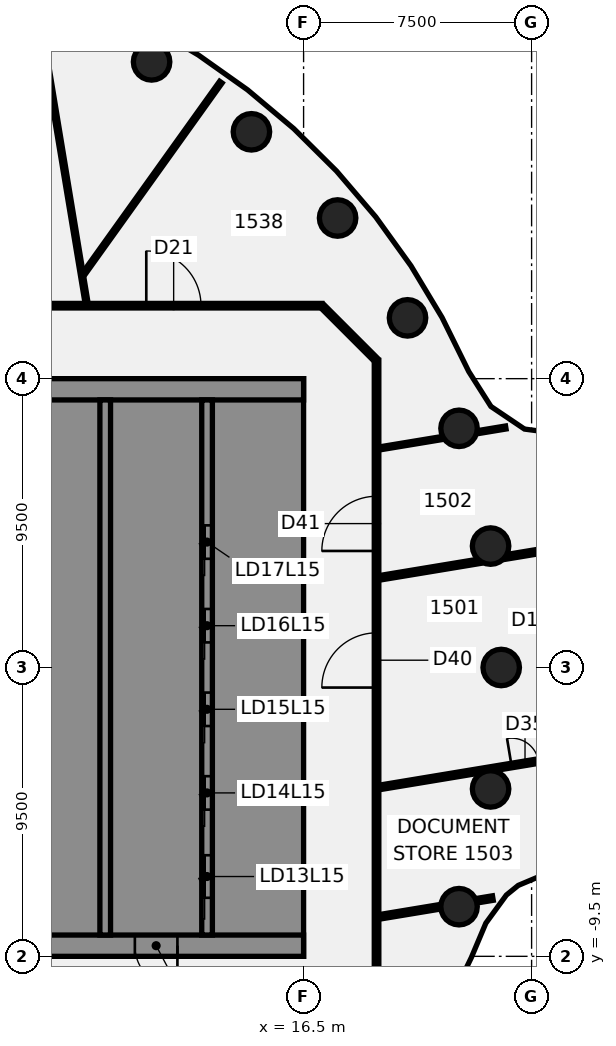
"""IFC4 building model, lengths in metres.
Left out: names, types, materials, properties, quantities, classifications, styles, units other than length and angle.
Written with IfcOpenShell. Run it as: python <this file> out.ifc"""

import sys

from ifc_helpers import new_model, si_unit, direction, frame, frame_2d, origin, origin_2d, place, context, subcontext, project, spatial, polyline, rectangle, circle, outline, extrude, element, fill, save


model = new_model("IFC4")
c1 = context("Model", 3, precision=1e-05, world=origin(), true_north=direction((0.0, 1.0)))
c2 = subcontext(c1, "Body", "Model", "MODEL_VIEW")
j1 = project(units=[si_unit("LENGTHUNIT", "METRE"), si_unit("PLANEANGLEUNIT", "RADIAN")], contexts=[c1])
p1 = place(None, origin())
s1 = spatial("IfcSite", under=j1, at=p1, CompositionType="ELEMENT")
p2 = place(p1, origin())
s2 = spatial("IfcBuilding", under=s1, at=p2, CompositionType="ELEMENT")
p3 = place(p2, frame((0.0, 0.0, 67.75)))
s3 = spatial("IfcBuildingStorey", under=s2, at=p3, CompositionType="ELEMENT", Elevation=67.75)
for number, where, z_axis, x_axis in (
    (1, (23.0, 0.0, -0.14), (0.0, 0.0, 1.0), (1.0, 0.0, 0.0)),
    (2, (22.651, 3.994, -0.14), (0.0, 0.0, 1.0), (1.0, 0.0, 0.0)),
    (3, (21.613, 7.866, -0.14), (0.0, 0.0, 1.0), (1.0, 0.0, 0.0)),
    (4, (19.919, 11.5, -0.14), (0.0, 0.0, 1.0), (1.0, 0.0, 0.0)),
    (5, (17.619, 14.784, -0.14), (0.0, 0.0, 1.0), (1.0, 0.0, 0.0)),
    (6, (14.784, 17.619, -0.14), (0.0, 0.0, 1.0), (1.0, 0.0, 0.0)),
    (7, (11.5, 19.919, -0.14), (0.0, 0.0, 1.0), (1.0, 0.0, 0.0)),
    (8, (21.613, -7.866, -0.14), (0.0, 0.0, 1.0), (1.0, 0.0, 0.0)),
    (9, (22.651, -3.994, -0.14), (0.0, 0.0, 1.0), (1.0, 0.0, 0.0)),
):
    element("IfcColumn", number, at=place(p3, frame(where, z_axis=z_axis, x_axis=x_axis)), inside=s3, PredefinedType="COLUMN", context=c2, shape_type="SweptSolid", body=[
        extrude(circle(Radius=0.6, at=origin_2d()), origin(), (0.0, 0.0, 1.0), 3.75),
    ])
p4 = place(p3, frame((7.868, 21.003, 0.0), z_axis=(0.0, 0.0, 1.0), x_axis=(0.163392122056, -0.986561206642, 0.0)))
e10 = element("IfcWall", 10, at=p4, inside=s3, PredefinedType="PARTITIONING", context=c2, shape_type="SweptSolid", body=[
    extrude(rectangle(XDim=9.162, YDim=0.1, at=frame_2d((4.581, 0.0))), origin(), (0.0, 0.0, 1.0), 3.01),
])
p5 = place(p3, frame((17.128, 11.872, 0.0), z_axis=(0.0, 0.0, 1.0), x_axis=(0.707106781187, -0.707106781187, 0.0)))
e11 = element("IfcWall", 11, at=p5, inside=s3, PredefinedType="PARTITIONING", context=c2, shape_type="SweptSolid", body=[
    extrude(rectangle(XDim=2.465, YDim=0.15, at=frame_2d((1.232, 0.0))), origin(), (0.0, 0.0, 1.0), 3.01),
])
p6 = place(p3, frame((-17.065, 11.9, 0.0), z_axis=(0.0, 0.0, 1.0), x_axis=(1.0, 0.0, 0.0)))
e12 = element("IfcWall", 12, at=p6, inside=s3, PredefinedType="PARTITIONING", context=c2, shape_type="SweptSolid", body=[
    extrude(rectangle(XDim=34.165, YDim=0.15, at=frame_2d((17.083, 0.0))), origin(), (0.0, 0.0, 1.0), 3.01),
])
p7 = place(p6, frame((17.833, 0.0, 0.0)))
e13 = element("IfcOpeningElement", 13, at=p7, cuts=e12, PredefinedType="OPENING", context=c2, shape_type="SweptSolid", body=[
    extrude(rectangle(XDim=1.8, YDim=2.1, at=frame_2d((0.9, 1.05))), frame((0.0, 0.085, 0.0), z_axis=(0.0, -1.0, 0.0), x_axis=(1.0, 0.0, 0.0)), (0.0, 0.0, 1.0), 0.17),
])
p8 = place(p6, frame((28.391, 0.0, 0.0)))
e14 = element("IfcOpeningElement", 14, at=p8, cuts=e12, PredefinedType="OPENING", context=c2, shape_type="SweptSolid", body=[
    extrude(rectangle(XDim=1.8, YDim=2.1, at=frame_2d((0.9, 1.05))), frame((0.0, 0.085, 0.0), z_axis=(0.0, -1.0, 0.0), x_axis=(1.0, 0.0, 0.0)), (0.0, 0.0, 1.0), 0.17),
])
p9 = place(p6, frame((4.791, 0.0, 0.0)))
e15 = element("IfcOpeningElement", 15, at=p9, cuts=e12, PredefinedType="OPENING", context=c2, shape_type="SweptSolid", body=[
    extrude(rectangle(XDim=1.8, YDim=2.1, at=frame_2d((0.9, 1.05))), frame((0.0, 0.085, 0.0), z_axis=(0.0, -1.0, 0.0), x_axis=(1.0, 0.0, 0.0)), (0.0, 0.0, 1.0), 0.17),
])
p10 = place(p3, frame((18.969, -3.948, 0.0), z_axis=(0.0, 0.0, 1.0), x_axis=(0.986548318121, 0.16346992388, 0.0)))
e16 = element("IfcWall", 16, at=p10, inside=s3, PredefinedType="PARTITIONING", context=c2, shape_type="SweptSolid", body=[
    extrude(rectangle(XDim=7.33, YDim=0.15, at=frame_2d((3.665, 0.0))), origin(), (0.0, 0.0, 1.0), 3.01),
])
p11 = place(p10, frame((4.43, 0.0, 0.0)))
e17 = element("IfcOpeningElement", 17, at=p11, cuts=e16, PredefinedType="OPENING", context=c2, shape_type="SweptSolid", body=[
    extrude(rectangle(XDim=0.9, YDim=2.1, at=frame_2d((0.45, 1.05))), frame((0.0, 0.085, 0.0), z_axis=(0.0, -1.0, 0.0), x_axis=(1.0, 0.0, 0.0)), (0.0, 0.0, 1.0), 0.17),
])
p12 = place(p3, frame((18.969, 2.944, 0.0), z_axis=(0.0, 0.0, 1.0), x_axis=(0.986566632444, 0.163359357698, 0.0)))
e18 = element("IfcWall", 18, at=p12, inside=s3, PredefinedType="PARTITIONING", context=c2, shape_type="SweptSolid", body=[
    extrude(rectangle(XDim=3.39, YDim=0.15, at=frame_2d((1.695, 0.0))), origin(), (0.0, 0.0, 1.0), 3.01),
])
p13 = place(p3, frame((23.122, 3.632, 0.0), z_axis=(0.0, 0.0, 1.0), x_axis=(0.986558466043, 0.163408668924, 0.0)))
e19 = element("IfcWall", 19, at=p13, inside=s3, PredefinedType="PARTITIONING", context=c2, shape_type="SweptSolid", body=[
    extrude(rectangle(XDim=1.999, YDim=0.15, at=frame_2d((1.0, 0.0))), origin(), (0.0, 0.0, 1.0), 3.01),
])
p14 = place(p3, frame((18.964, 7.201, 0.0), z_axis=(0.0, 0.0, 1.0), x_axis=(0.986582854275, 0.163261359945, 0.0)))
e20 = element("IfcWall", 20, at=p14, inside=s3, PredefinedType="PARTITIONING", context=c2, shape_type="SweptSolid", body=[
    extrude(rectangle(XDim=2.158, YDim=0.1, at=frame_2d((1.079, 0.0))), origin(), (0.0, 0.0, 1.0), 3.01),
])
p15 = place(p3, frame((22.188, 7.734, 0.0), z_axis=(0.0, 0.0, 1.0), x_axis=(0.986582475576, 0.163263648391, 0.0)))
e21 = element("IfcWall", 21, at=p15, inside=s3, PredefinedType="PARTITIONING", context=c2, shape_type="SweptSolid", body=[
    extrude(rectangle(XDim=0.977, YDim=0.1, at=frame_2d((0.488, 0.0))), origin(), (0.0, 0.0, 1.0), 3.01),
])
p16 = place(p3, frame((18.969, -8.206, 0.0), z_axis=(0.0, 0.0, 1.0), x_axis=(0.986543898424, 0.163496594711, 0.0)))
e22 = element("IfcWall", 22, at=p16, inside=s3, PredefinedType="PARTITIONING", context=c2, shape_type="SweptSolid", body=[
    extrude(rectangle(XDim=2.062, YDim=0.15, at=frame_2d((1.031, 0.0))), origin(), (0.0, 0.0, 1.0), 3.01),
])
p17 = place(p3, frame((22.172, -7.675, 0.0), z_axis=(0.0, 0.0, 1.0), x_axis=(0.986534635248, 0.163552479212, 0.0)))
e23 = element("IfcWall", 23, at=p17, inside=s3, PredefinedType="PARTITIONING", context=c2, shape_type="SweptSolid", body=[
    extrude(rectangle(XDim=0.561, YDim=0.15, at=frame_2d((0.281, 0.0))), origin(), (0.0, 0.0, 1.0), 3.01),
])
p18 = place(p3, frame((9.272, 12.955, 0.0), z_axis=(0.0, 0.0, 1.0), x_axis=(0.582049126749, 0.813153622663, 0.0)))
e24 = element("IfcWall", 24, at=p18, inside=s3, PredefinedType="PARTITIONING", context=c2, shape_type="SweptSolid", body=[
    extrude(rectangle(XDim=7.743, YDim=0.1, at=frame_2d((3.872, 0.0))), origin(), (0.0, 0.0, 1.0), 3.01),
])
p19 = place(p3, frame((18.9, -10.1, 0.0), z_axis=(0.0, 0.0, 1.0), x_axis=(0.0, 1.0, 0.0)))
e25 = element("IfcWall", 25, at=p19, inside=s3, PredefinedType="PARTITIONING", context=c2, shape_type="SweptSolid", body=[
    extrude(rectangle(XDim=20.2, YDim=0.15, at=frame_2d((10.1, 0.0))), origin(), (0.0, 0.0, 1.0), 3.01),
])
p20 = place(p19, frame((9.44, 0.0, 0.0)))
e26 = element("IfcOpeningElement", 26, at=p20, cuts=e25, PredefinedType="OPENING", context=c2, shape_type="SweptSolid", body=[
    extrude(rectangle(XDim=1.8, YDim=2.1, at=frame_2d((0.9, 1.05))), frame((0.0, 0.085, 0.0), z_axis=(0.0, -1.0, 0.0), x_axis=(1.0, 0.0, 0.0)), (0.0, 0.0, 1.0), 0.17),
])
p21 = place(p19, frame((13.933, 0.0, 0.0)))
e27 = element("IfcOpeningElement", 27, at=p21, cuts=e25, PredefinedType="OPENING", context=c2, shape_type="SweptSolid", body=[
    extrude(rectangle(XDim=1.8, YDim=2.1, at=frame_2d((0.9, 1.05))), frame((0.0, 0.085, 0.0), z_axis=(0.0, -1.0, 0.0), x_axis=(1.0, 0.0, 0.0)), (0.0, 0.0, 1.0), 0.17),
])
p22 = place(p3, frame((16.5, -9.15, 0.0), z_axis=(0.0, 0.0, 1.0), x_axis=(-1.0, 0.0, 0.0)))
e28 = element("IfcWall", 28, at=p22, inside=s3, PredefinedType="SHEAR", context=c2, shape_type="SweptSolid", body=[
    extrude(rectangle(XDim=13.0, YDim=0.7, at=frame_2d((6.5, 0.0))), origin(), (0.0, 0.0, 1.0), 3.61),
])
p23 = place(p22, frame((4.15, 0.0, 0.0)))
e29 = element("IfcOpeningElement", 29, at=p23, cuts=e28, PredefinedType="OPENING", context=c2, shape_type="SweptSolid", body=[
    extrude(rectangle(XDim=1.4, YDim=2.1, at=frame_2d((0.7, 1.05))), frame((0.0, 0.36, 0.0), z_axis=(0.0, -1.0, 0.0), x_axis=(1.0, 0.0, 0.0)), (0.0, 0.0, 1.0), 0.72),
])
p24 = place(p22, frame((10.125, 0.0, 0.0)))
e30 = element("IfcOpeningElement", 30, at=p24, cuts=e28, PredefinedType="OPENING", context=c2, shape_type="SweptSolid", body=[
    extrude(rectangle(XDim=1.4, YDim=2.1, at=frame_2d((0.7, 1.05))), frame((0.0, 0.36, 0.0), z_axis=(0.0, -1.0, 0.0), x_axis=(1.0, 0.0, 0.0)), (0.0, 0.0, 1.0), 0.72),
])
p25 = place(p3, origin())
e31 = element("IfcWall", 31, at=p25, inside=s3, PredefinedType="SHEAR", context=c2, shape_type="SweptSolid", body=[
    extrude(outline(polyline([(13.5, -8.8), (15.8, -8.8), (16.5, -8.8), (16.5, 8.8), (15.8, 8.8), (13.5, 8.8), (13.5, 8.125), (15.8, 8.125), (15.8, 5.625), (13.5, 5.625), (13.5, 5.375), (15.8, 5.375), (15.8, 2.875), (13.5, 2.875), (13.5, 2.625), (15.8, 2.625), (15.8, 0.125), (13.5, 0.125), (13.5, -0.125), (15.8, -0.125), (15.8, -2.625), (13.5, -2.625), (13.5, -2.875), (15.8, -2.875), (15.8, -5.375), (13.5, -5.375), (13.5, -5.625), (15.8, -5.625), (15.8, -8.125), (13.5, -8.125), (13.5, -8.8)])), origin(), (0.0, 0.0, 1.0), 3.61),
])
p26 = place(p3, frame((16.5, 9.15, 0.0), z_axis=(0.0, 0.0, 1.0), x_axis=(-1.0, 0.0, 0.0)))
e32 = element("IfcWall", 32, at=p26, inside=s3, PredefinedType="SHEAR", context=c2, shape_type="SweptSolid", body=[
    extrude(rectangle(XDim=13.0, YDim=0.7, at=frame_2d((6.5, 0.0))), origin(), (0.0, 0.0, 1.0), 3.61),
])
p27 = place(p3, origin())
e33 = element("IfcWall", 33, at=p27, inside=s3, PredefinedType="SHEAR", context=c2, shape_type="SweptSolid", body=[
    extrude(outline(polyline([(9.8, -5.375), (7.5, -5.375), (7.5, -2.875), (9.8, -2.875), (9.8, -2.625), (7.5, -2.625), (7.5, -0.125), (9.8, -0.125), (9.8, 0.125), (7.5, 0.125), (7.5, 2.625), (9.8, 2.625), (9.8, 2.875), (7.5, 2.875), (7.5, 5.375), (9.8, 5.375), (9.8, 5.625), (7.5, 5.625), (7.5, 8.125), (9.8, 8.125), (9.8, 8.8), (7.5, 8.8), (7.15, 8.8), (7.15, -5.625), (7.5, -5.625), (9.8, -5.625), (9.8, -5.375)])), origin(), (0.0, 0.0, 1.0), 3.61),
])
p28 = place(p3, origin())
e34 = element("IfcWall", 34, at=p28, inside=s3, PredefinedType="SHEAR", context=c2, shape_type="SweptSolid", body=[
    extrude(outline(polyline([(7.5, -8.125), (7.5, -8.8), (9.8, -8.8), (9.8, -8.125), (9.8, -5.625), (9.55, -5.625), (9.55, -8.125), (7.5, -8.125)])), origin(), (0.0, 0.0, 1.0), 3.61),
])
p29 = place(p3, frame((13.325, -8.8, 0.0), z_axis=(0.0, 0.0, 1.0), x_axis=(0.0, 1.0, 0.0)))
e35 = element("IfcWall", 35, at=p29, inside=s3, PredefinedType="SHEAR", context=c2, shape_type="SweptSolid", body=[
    extrude(rectangle(XDim=17.6, YDim=0.35, at=frame_2d((8.8, 0.0))), origin(), (0.0, 0.0, 1.0), 3.61),
])
p30 = place(p29, frame((1.225, 0.0, 0.0)))
e36 = element("IfcOpeningElement", 36, at=p30, cuts=e35, PredefinedType="OPENING", context=c2, shape_type="SweptSolid", body=[
    extrude(rectangle(XDim=1.4, YDim=2.1, at=frame_2d((0.7, 1.05))), frame((0.0, 0.185, 0.0), z_axis=(0.0, -1.0, 0.0), x_axis=(1.0, 0.0, 0.0)), (0.0, 0.0, 1.0), 0.37),
])
p31 = place(p29, frame((4.125, 0.0, 0.0)))
e37 = element("IfcOpeningElement", 37, at=p31, cuts=e35, PredefinedType="OPENING", context=c2, shape_type="SweptSolid", body=[
    extrude(rectangle(XDim=1.1, YDim=2.1, at=frame_2d((0.55, 1.05))), frame((0.0, 0.185, 0.0), z_axis=(0.0, -1.0, 0.0), x_axis=(1.0, 0.0, 0.0)), (0.0, 0.0, 1.0), 0.37),
])
p32 = place(p29, frame((6.875, 0.0, 0.0)))
e38 = element("IfcOpeningElement", 38, at=p32, cuts=e35, PredefinedType="OPENING", context=c2, shape_type="SweptSolid", body=[
    extrude(rectangle(XDim=1.1, YDim=2.1, at=frame_2d((0.55, 1.05))), frame((0.0, 0.185, 0.0), z_axis=(0.0, -1.0, 0.0), x_axis=(1.0, 0.0, 0.0)), (0.0, 0.0, 1.0), 0.37),
])
p33 = place(p29, frame((9.625, 0.0, 0.0)))
e39 = element("IfcOpeningElement", 39, at=p33, cuts=e35, PredefinedType="OPENING", context=c2, shape_type="SweptSolid", body=[
    extrude(rectangle(XDim=1.1, YDim=2.1, at=frame_2d((0.55, 1.05))), frame((0.0, 0.185, 0.0), z_axis=(0.0, -1.0, 0.0), x_axis=(1.0, 0.0, 0.0)), (0.0, 0.0, 1.0), 0.37),
])
p34 = place(p29, frame((12.375, 0.0, 0.0)))
e40 = element("IfcOpeningElement", 40, at=p34, cuts=e35, PredefinedType="OPENING", context=c2, shape_type="SweptSolid", body=[
    extrude(rectangle(XDim=1.1, YDim=2.1, at=frame_2d((0.55, 1.05))), frame((0.0, 0.185, 0.0), z_axis=(0.0, -1.0, 0.0), x_axis=(1.0, 0.0, 0.0)), (0.0, 0.0, 1.0), 0.37),
])
p35 = place(p3, frame((9.975, -8.8, 0.0), z_axis=(0.0, 0.0, 1.0), x_axis=(0.0, 1.0, 0.0)))
e41 = element("IfcWall", 41, at=p35, inside=s3, PredefinedType="SHEAR", context=c2, shape_type="SweptSolid", body=[
    extrude(rectangle(XDim=17.6, YDim=0.35, at=frame_2d((8.8, 0.0))), origin(), (0.0, 0.0, 1.0), 3.61),
])
p36 = place(p8, origin())
e42 = element("IfcDoor", 42, at=p36, inside=s3, OperationType="DOUBLE_DOOR_SINGLE_SWING", PredefinedType="DOOR", context=c2, shape_type="SweptSolid", body=[
    extrude(rectangle(XDim=1.8, YDim=2.1, at=frame_2d((0.9, 1.05))), frame((0.0, 0.025, 0.0), z_axis=(0.0, -1.0, 0.0), x_axis=(1.0, 0.0, 0.0)), (0.0, 0.0, 1.0), 0.05),
])
fill(e14, e42)
p37 = place(p11, frame((0.9, 0.0, 0.0), z_axis=(0.0, 0.0, 1.0), x_axis=(-1.0, 0.0, 0.0)))
e43 = element("IfcDoor", 43, at=p37, inside=s3, OperationType="SINGLE_SWING_RIGHT", PredefinedType="DOOR", context=c2, shape_type="SweptSolid", body=[
    extrude(rectangle(XDim=0.9, YDim=2.1, at=frame_2d((0.45, 1.05))), frame((0.0, 0.025, 0.0), z_axis=(0.0, -1.0, 0.0), x_axis=(1.0, 0.0, 0.0)), (0.0, 0.0, 1.0), 0.05),
])
fill(e17, e43)
p38 = place(p20, origin())
e44 = element("IfcDoor", 44, at=p38, inside=s3, OperationType="DOUBLE_DOOR_SINGLE_SWING", PredefinedType="DOOR", context=c2, shape_type="SweptSolid", body=[
    extrude(rectangle(XDim=1.8, YDim=2.1, at=frame_2d((0.9, 1.05))), frame((0.0, 0.025, 0.0), z_axis=(0.0, -1.0, 0.0), x_axis=(1.0, 0.0, 0.0)), (0.0, 0.0, 1.0), 0.05),
])
fill(e26, e44)
p39 = place(p21, frame((1.8, 0.0, 0.0), z_axis=(0.0, 0.0, 1.0), x_axis=(-1.0, 0.0, 0.0)))
e45 = element("IfcDoor", 45, at=p39, inside=s3, OperationType="DOUBLE_DOOR_SINGLE_SWING", PredefinedType="DOOR", context=c2, shape_type="SweptSolid", body=[
    extrude(rectangle(XDim=1.8, YDim=2.1, at=frame_2d((0.9, 1.05))), frame((0.0, 0.025, 0.0), z_axis=(0.0, -1.0, 0.0), x_axis=(1.0, 0.0, 0.0)), (0.0, 0.0, 1.0), 0.05),
])
fill(e27, e45)
p40 = place(p23, origin())
e46 = element("IfcDoor", 46, at=p40, inside=s3, OperationType="SINGLE_SWING_LEFT", PredefinedType="DOOR", context=c2, shape_type="SweptSolid", body=[
    extrude(rectangle(XDim=1.4, YDim=2.1, at=frame_2d((0.7, 1.05))), frame((0.0, 0.025, 0.0), z_axis=(0.0, -1.0, 0.0), x_axis=(1.0, 0.0, 0.0)), (0.0, 0.0, 1.0), 0.05),
])
fill(e29, e46)
p41 = place(p30, origin())
e47 = element("IfcDoor", 47, at=p41, inside=s3, OperationType="SLIDING_TO_LEFT", PredefinedType="DOOR", context=c2, shape_type="SweptSolid", body=[
    extrude(rectangle(XDim=1.4, YDim=2.1, at=frame_2d((0.7, 1.05))), frame((0.0, 0.025, 0.0), z_axis=(0.0, -1.0, 0.0), x_axis=(1.0, 0.0, 0.0)), (0.0, 0.0, 1.0), 0.05),
])
fill(e36, e47)
p42 = place(p31, origin())
e48 = element("IfcDoor", 48, at=p42, inside=s3, OperationType="SLIDING_TO_LEFT", PredefinedType="DOOR", context=c2, shape_type="SweptSolid", body=[
    extrude(rectangle(XDim=1.1, YDim=2.1, at=frame_2d((0.55, 1.05))), frame((0.0, 0.025, 0.0), z_axis=(0.0, -1.0, 0.0), x_axis=(1.0, 0.0, 0.0)), (0.0, 0.0, 1.0), 0.05),
])
fill(e37, e48)
p43 = place(p32, origin())
e49 = element("IfcDoor", 49, at=p43, inside=s3, OperationType="SLIDING_TO_LEFT", PredefinedType="DOOR", context=c2, shape_type="SweptSolid", body=[
    extrude(rectangle(XDim=1.1, YDim=2.1, at=frame_2d((0.55, 1.05))), frame((0.0, 0.025, 0.0), z_axis=(0.0, -1.0, 0.0), x_axis=(1.0, 0.0, 0.0)), (0.0, 0.0, 1.0), 0.05),
])
fill(e38, e49)
p44 = place(p33, origin())
e50 = element("IfcDoor", 50, at=p44, inside=s3, OperationType="SLIDING_TO_LEFT", PredefinedType="DOOR", context=c2, shape_type="SweptSolid", body=[
    extrude(rectangle(XDim=1.1, YDim=2.1, at=frame_2d((0.55, 1.05))), frame((0.0, 0.025, 0.0), z_axis=(0.0, -1.0, 0.0), x_axis=(1.0, 0.0, 0.0)), (0.0, 0.0, 1.0), 0.05),
])
fill(e39, e50)
p45 = place(p34, origin())
e51 = element("IfcDoor", 51, at=p45, inside=s3, OperationType="SLIDING_TO_LEFT", PredefinedType="DOOR", context=c2, shape_type="SweptSolid", body=[
    extrude(rectangle(XDim=1.1, YDim=2.1, at=frame_2d((0.55, 1.05))), frame((0.0, 0.025, 0.0), z_axis=(0.0, -1.0, 0.0), x_axis=(1.0, 0.0, 0.0)), (0.0, 0.0, 1.0), 0.05),
])
fill(e40, e51)
save(model, sys.argv[1])
